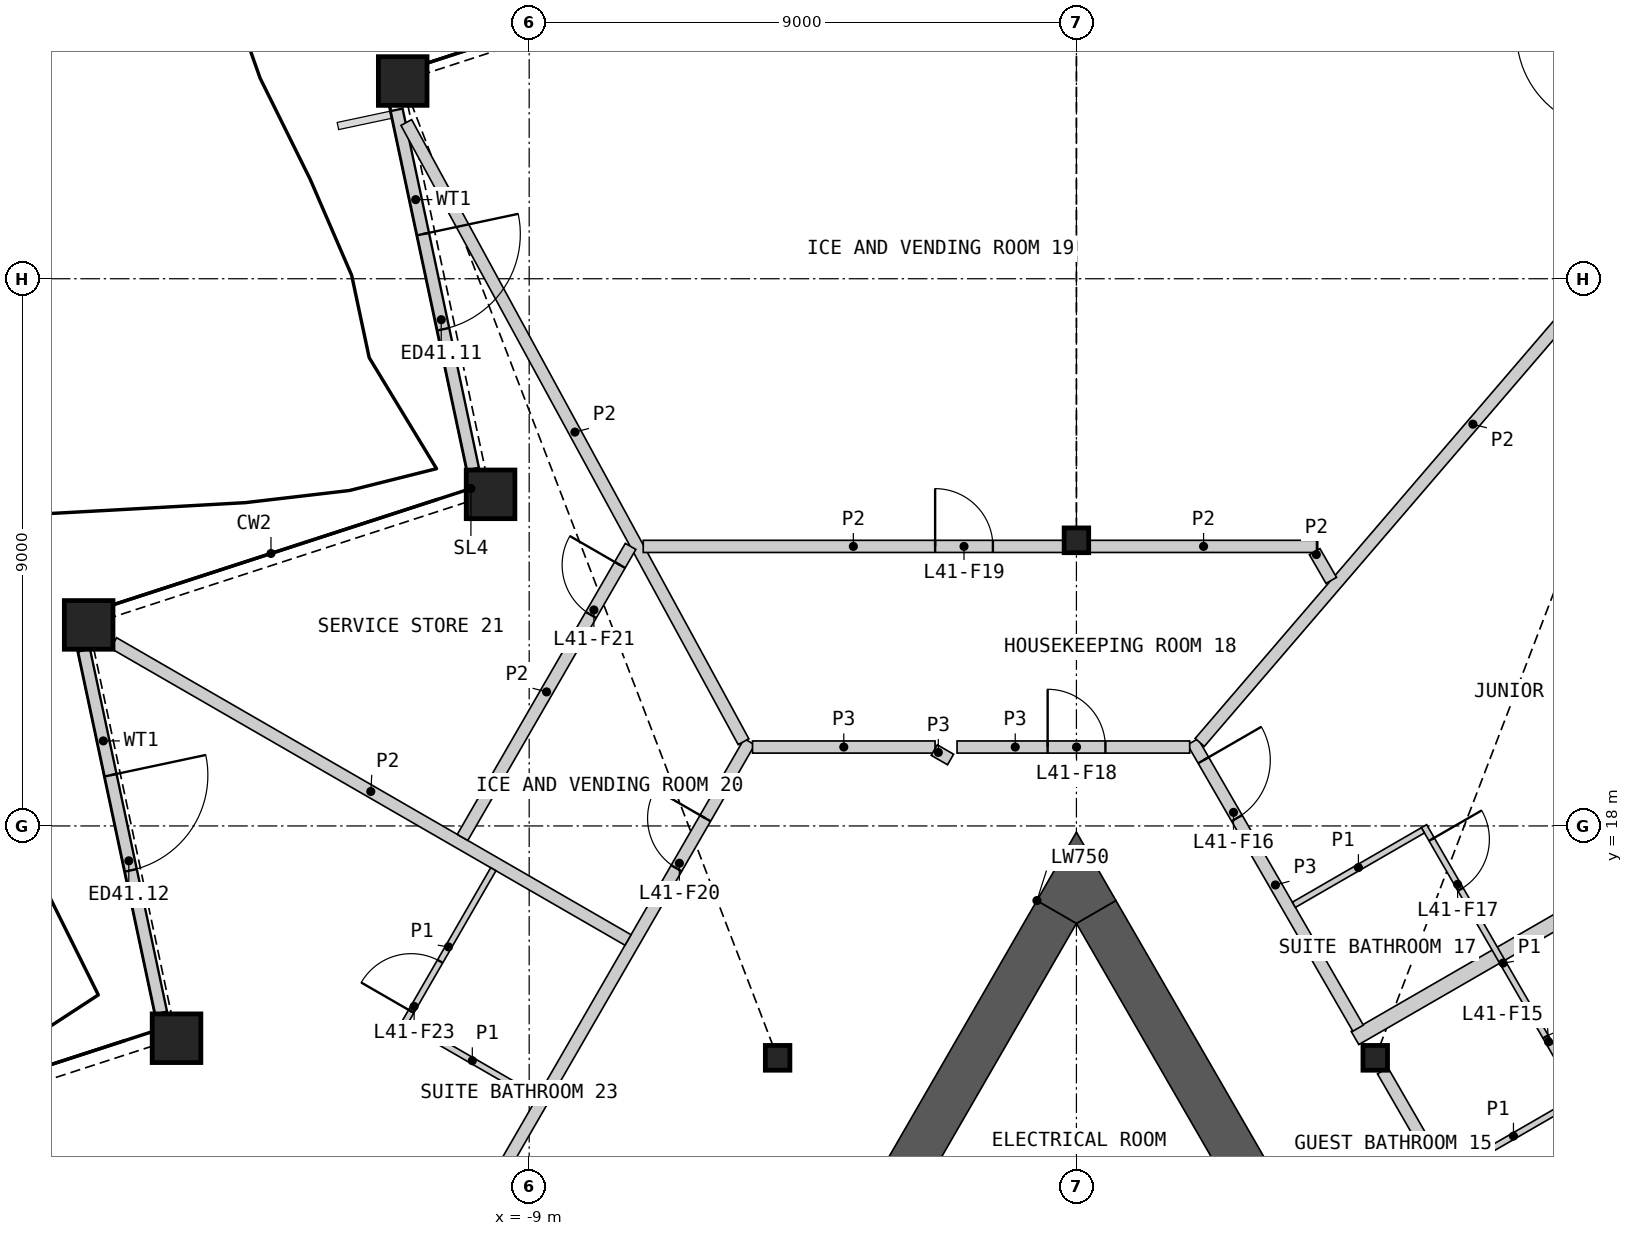
"""IFC4 building model, lengths in metres.
Left out: names, types, materials, properties, quantities, classifications, styles, units other than length and angle.
Written with IfcOpenShell. Run it as: python <this file> out.ifc"""

import sys

from ifc_helpers import new_model, si_unit, direction, frame, frame_2d, origin, origin_2d, place, context, subcontext, project, spatial, polyline, rectangle, hollow_rectangle, i_section, outline, extrude, element, fill, save


model = new_model("IFC4")
c1 = context("Model", 3, precision=1e-05, world=origin(), true_north=direction((0.0, 1.0)))
c2 = subcontext(c1, "Body", "Model", "MODEL_VIEW")
j1 = project(units=[si_unit("LENGTHUNIT", "METRE"), si_unit("PLANEANGLEUNIT", "RADIAN")], contexts=[c1])
p1 = place(None, origin())
s1 = spatial("IfcSite", under=j1, at=p1, CompositionType="ELEMENT")
p2 = place(p1, origin())
s2 = spatial("IfcBuilding", under=s1, at=p2, CompositionType="ELEMENT")
p3 = place(p2, frame((0.0, 0.0, 190.8)))
s3 = spatial("IfcBuildingStorey", under=s2, at=p3, CompositionType="ELEMENT", Elevation=190.8)
for number, where, z_axis, x_axis in (
    (1, (-11.08, 30.252, 0.0), (0.0, 0.0, 1.0), (1.0, 0.0, 0.0)),
    (2, (-9.635, 23.454, 0.0), (0.0, 0.0, 1.0), (1.0, 0.0, 0.0)),
    (3, (-16.245, 21.306, 0.0), (0.0, 0.0, 1.0), (1.0, 0.0, 0.0)),
    (4, (-14.8, 14.508, 0.0), (0.0, 0.0, 1.0), (1.0, 0.0, 0.0)),
):
    element("IfcColumn", number, at=place(p3, frame(where, z_axis=z_axis, x_axis=x_axis)), inside=s3, PredefinedType="COLUMN", context=c2, shape_type="SweptSolid", body=[
        extrude(hollow_rectangle(XDim=0.8, YDim=0.8, WallThickness=0.05, at=origin_2d()), origin(), (0.0, 0.0, 1.0), 3.6),
    ])
for number, where, z_axis, x_axis in (
    (5, (0.0, 22.698, 0.0), (0.0, 0.0, 1.0), (1.0, 0.0, 0.0)),
    (6, (-4.914, 14.186, 0.0), (0.0, 0.0, 1.0), (1.0, 0.0, 0.0)),
    (7, (4.914, 14.186, 0.0), (0.0, 0.0, 1.0), (1.0, 0.0, 0.0)),
):
    element("IfcColumn", number, at=place(p3, frame(where, z_axis=z_axis, x_axis=x_axis)), inside=s3, PredefinedType="COLUMN", context=c2, shape_type="SweptSolid", body=[
        extrude(i_section(OverallWidth=0.404, OverallDepth=0.407, WebThickness=0.027, FlangeThickness=0.044, at=origin_2d()), origin(), (0.0, 0.0, 1.0), 3.6),
    ])
p4 = place(p3, frame((10.825, 30.394, 0.0), z_axis=(0.0, 0.0, 1.0), x_axis=(-0.9510558006, 0.30901919705, 0.0)))
e8 = element("IfcWall", 8, at=p4, inside=s3, PredefinedType="SOLIDWALL", context=c2, shape_type="SweptSolid", body=[
    extrude(rectangle(XDim=5.778, YDim=0.2, at=frame_2d((2.889, 0.0))), origin(), (0.0, 0.0, 1.0), 2.701),
])
p5 = place(p4, frame((2.089, 0.0, 0.0)))
e9 = element("IfcOpeningElement", 9, at=p5, cuts=e8, PredefinedType="OPENING", context=c2, shape_type="SweptSolid", body=[
    extrude(rectangle(XDim=1.6, YDim=2.4, at=frame_2d((0.8, 1.2))), frame((0.0, 0.11, 0.0), z_axis=(0.0, -1.0, 0.0), x_axis=(1.0, 0.0, 0.0)), (0.0, 0.0, 1.0), 0.22),
])
p6 = place(p3, frame((-11.18, 29.778, 0.0), z_axis=(0.0, 0.0, 1.0), x_axis=(0.207894531291, -0.978151247946, 0.0)))
e10 = element("IfcWall", 10, at=p6, inside=s3, PredefinedType="SOLIDWALL", context=c2, shape_type="SweptSolid", body=[
    extrude(rectangle(XDim=6.04, YDim=0.2, at=frame_2d((3.02, 0.0))), origin(), (0.0, 0.0, 1.0), 2.701),
])
p7 = place(p6, frame((2.089, 0.0, 0.0)))
e11 = element("IfcOpeningElement", 11, at=p7, cuts=e10, PredefinedType="OPENING", context=c2, shape_type="SweptSolid", body=[
    extrude(rectangle(XDim=1.6, YDim=2.4, at=frame_2d((0.8, 1.2))), frame((0.0, 0.11, 0.0), z_axis=(0.0, -1.0, 0.0), x_axis=(1.0, 0.0, 0.0)), (0.0, 0.0, 1.0), 0.22),
])
p8 = place(p3, frame((-16.321, 20.89, 0.0), z_axis=(0.0, 0.0, 1.0), x_axis=(0.207912864597, -0.978147351238, 0.0)))
e12 = element("IfcWall", 12, at=p8, inside=s3, PredefinedType="SOLIDWALL", context=c2, shape_type="SweptSolid", body=[
    extrude(rectangle(XDim=6.098, YDim=0.2, at=frame_2d((3.049, 0.0))), origin(), (0.0, 0.0, 1.0), 2.701),
])
p9 = place(p8, frame((2.101, 0.0, 0.0)))
e13 = element("IfcOpeningElement", 13, at=p9, cuts=e12, PredefinedType="OPENING", context=c2, shape_type="SweptSolid", body=[
    extrude(rectangle(XDim=1.6, YDim=2.4, at=frame_2d((0.8, 1.2))), frame((0.0, 0.11, 0.0), z_axis=(0.0, -1.0, 0.0), x_axis=(1.0, 0.0, 0.0)), (0.0, 0.0, 1.0), 0.22),
])
p10 = place(p3, frame((6.875, 5.24, 0.0), z_axis=(0.0, 0.0, 1.0), x_axis=(-0.499997217876, 0.866027010039, 0.0)))
e14 = element("IfcWall", 14, at=p10, inside=s3, PredefinedType="SHEAR", context=c2, shape_type="SweptSolid", body=[
    extrude(rectangle(XDim=13.101, YDim=0.75, at=frame_2d((6.551, 0.0))), origin(), (0.0, 0.0, 1.0), 3.25),
])
p11 = place(p3, frame((-0.325, 16.585, 0.0), z_axis=(0.0, 0.0, 1.0), x_axis=(-0.500012199891, -0.86601836006, 0.0)))
e15 = element("IfcWall", 15, at=p11, inside=s3, PredefinedType="SHEAR", context=c2, shape_type="SweptSolid", body=[
    extrude(rectangle(XDim=7.051, YDim=0.75, at=frame_2d((3.525, 0.0))), origin(), (0.0, 0.0, 1.0), 3.25),
])
p12 = place(p3, origin())
e16 = element("IfcWall", 16, at=p12, inside=s3, PredefinedType="SHEAR", context=c2, shape_type="SweptSolid", body=[
    extrude(outline(polyline([(-0.649, 16.773), (0.0, 17.898), (0.649, 16.773), (0.0, 16.398), (-0.649, 16.773)])), origin(), (0.0, 0.0, 1.0), 3.25),
])
p13 = place(p3, frame((-19.476, -5.035, 0.0), z_axis=(0.0, 0.0, 1.0), x_axis=(0.500000757641, 0.86602496636, 0.0)))
e17 = element("IfcWall", 17, at=p13, inside=s3, PredefinedType="PARTITIONING", context=c2, shape_type="SweptSolid", body=[
    extrude(rectangle(XDim=28.198, YDim=0.2, at=frame_2d((14.099, 0.0))), origin(), (0.0, 0.0, 1.0), 3.25),
])
p14 = place(p13, frame((25.796, 0.0, 0.0)))
e18 = element("IfcOpeningElement", 18, at=p14, cuts=e17, PredefinedType="OPENING", context=c2, shape_type="SweptSolid", body=[
    extrude(rectangle(XDim=0.95, YDim=2.1, at=frame_2d((0.475, 1.05))), frame((0.0, 0.11, 0.0), z_axis=(0.0, -1.0, 0.0), x_axis=(1.0, 0.0, 0.0)), (0.0, 0.0, 1.0), 0.22),
])
p15 = place(p13, frame((14.603, 0.0, 0.0)))
e19 = element("IfcOpeningElement", 19, at=p15, cuts=e17, PredefinedType="OPENING", context=c2, shape_type="SweptSolid", body=[
    extrude(rectangle(XDim=1.1, YDim=2.1, at=frame_2d((0.55, 1.05))), frame((0.0, 0.11, 0.0), z_axis=(0.0, -1.0, 0.0), x_axis=(1.0, 0.0, 0.0)), (0.0, 0.0, 1.0), 0.22),
])
p16 = place(p13, frame((11.993, 0.0, 0.0)))
e20 = element("IfcOpeningElement", 20, at=p16, cuts=e17, PredefinedType="OPENING", context=c2, shape_type="SweptSolid", body=[
    extrude(rectangle(XDim=1.1, YDim=2.1, at=frame_2d((0.55, 1.05))), frame((0.0, 0.11, 0.0), z_axis=(0.0, -1.0, 0.0), x_axis=(1.0, 0.0, 0.0)), (0.0, 0.0, 1.0), 0.22),
])
p17 = place(p13, frame((1.452, 0.0, 0.0)))
e21 = element("IfcOpeningElement", 21, at=p17, cuts=e17, PredefinedType="OPENING", context=c2, shape_type="SweptSolid", body=[
    extrude(rectangle(XDim=0.95, YDim=2.1, at=frame_2d((0.475, 1.05))), frame((0.0, 0.11, 0.0), z_axis=(0.0, -1.0, 0.0), x_axis=(1.0, 0.0, 0.0)), (0.0, 0.0, 1.0), 0.22),
])
p18 = place(p3, frame((4.582, 14.512, 0.0), z_axis=(0.0, 0.0, 1.0), x_axis=(0.866027263711, 0.4999967785, 0.0)))
e22 = element("IfcWall", 22, at=p18, inside=s3, PredefinedType="PARTITIONING", context=c2, shape_type="SweptSolid", body=[
    extrude(rectangle(XDim=12.994, YDim=0.25, at=frame_2d((6.497, 0.0))), origin(), (0.0, 0.0, 1.0), 2.404),
])
p19 = place(p3, frame((5.038, 13.972, 0.0), z_axis=(0.0, 0.0, 1.0), x_axis=(0.50000393355, -0.866023132736, 0.0)))
e23 = element("IfcWall", 23, at=p19, inside=s3, PredefinedType="PARTITIONING", context=c2, shape_type="SweptSolid", body=[
    extrude(rectangle(XDim=9.335, YDim=0.2, at=frame_2d((4.667, 0.0))), origin(), (0.0, 0.0, 1.0), 3.25),
])
p20 = place(p19, frame((5.979, 0.0, 0.0)))
e24 = element("IfcOpeningElement", 24, at=p20, cuts=e23, PredefinedType="OPENING", context=c2, shape_type="SweptSolid", body=[
    extrude(rectangle(XDim=1.8, YDim=2.1, at=frame_2d((0.9, 1.05))), frame((0.0, 0.11, 0.0), z_axis=(0.0, -1.0, 0.0), x_axis=(1.0, 0.0, 0.0)), (0.0, 0.0, 1.0), 0.22),
])
p21 = place(p19, frame((3.163, 0.0, 0.0)))
e25 = element("IfcOpeningElement", 25, at=p21, cuts=e23, PredefinedType="OPENING", context=c2, shape_type="SweptSolid", body=[
    extrude(rectangle(XDim=1.0, YDim=2.1, at=frame_2d((0.5, 1.05))), frame((0.0, 0.11, 0.0), z_axis=(0.0, -1.0, 0.0), x_axis=(1.0, 0.0, 0.0)), (0.0, 0.0, 1.0), 0.22),
])
p22 = place(p3, frame((1.913, 19.385, 0.0), z_axis=(0.0, 0.0, 1.0), x_axis=(0.499972435384, -0.866041317638, 0.0)))
e26 = element("IfcWall", 26, at=p22, inside=s3, PredefinedType="PARTITIONING", context=c2, shape_type="SweptSolid", body=[
    extrude(rectangle(XDim=5.439, YDim=0.2, at=frame_2d((2.719, 0.0))), origin(), (0.0, 0.0, 1.0), 3.25),
])
p23 = place(p22, frame((0.351, 0.0, 0.0)))
e27 = element("IfcOpeningElement", 27, at=p23, cuts=e26, PredefinedType="OPENING", context=c2, shape_type="SweptSolid", body=[
    extrude(rectangle(XDim=1.1, YDim=2.1, at=frame_2d((0.55, 1.05))), frame((0.0, 0.11, 0.0), z_axis=(0.0, -1.0, 0.0), x_axis=(1.0, 0.0, 0.0)), (0.0, 0.0, 1.0), 0.22),
])
p24 = place(p3, frame((-1.963, 19.298, 0.0), z_axis=(0.0, 0.0, 1.0), x_axis=(1.0, 0.0, 0.0)))
e28 = element("IfcWall", 28, at=p24, inside=s3, PredefinedType="PARTITIONING", context=c2, shape_type="SweptSolid", body=[
    extrude(rectangle(XDim=3.826, YDim=0.2, at=frame_2d((1.913, 0.0))), origin(), (0.0, 0.0, 1.0), 3.25),
])
p25 = place(p24, frame((1.49, 0.0, 0.0)))
e29 = element("IfcOpeningElement", 29, at=p25, cuts=e28, PredefinedType="OPENING", context=c2, shape_type="SweptSolid", body=[
    extrude(rectangle(XDim=0.95, YDim=2.1, at=frame_2d((0.475, 1.05))), frame((0.0, 0.11, 0.0), z_axis=(0.0, -1.0, 0.0), x_axis=(1.0, 0.0, 0.0)), (0.0, 0.0, 1.0), 0.22),
])
p26 = place(p3, frame((-5.327, 19.298, 0.0), z_axis=(0.0, 0.0, 1.0), x_axis=(1.0, 0.0, 0.0)))
e30 = element("IfcWall", 30, at=p26, inside=s3, PredefinedType="PARTITIONING", context=c2, shape_type="SweptSolid", body=[
    extrude(rectangle(XDim=3.002, YDim=0.2, at=frame_2d((1.501, 0.0))), origin(), (0.0, 0.0, 1.0), 3.25),
])
p27 = place(p3, frame((-2.338, 19.248, 0.0), z_axis=(0.0, 0.0, 1.0), x_axis=(0.866395311824, -0.499358752451, 0.0)))
e31 = element("IfcWall", 31, at=p27, inside=s3, PredefinedType="PARTITIONING", context=c2, shape_type="SweptSolid", body=[
    extrude(rectangle(XDim=0.31, YDim=0.2, at=frame_2d((0.155, 0.0))), origin(), (0.0, 0.0, 1.0), 3.25),
])
p28 = place(p3, frame((2.028, 19.374, 0.0), z_axis=(0.0, 0.0, 1.0), x_axis=(0.651304244859, 0.758816697647, 0.0)))
e32 = element("IfcWall", 32, at=p28, inside=s3, PredefinedType="PARTITIONING", context=c2, shape_type="SweptSolid", body=[
    extrude(rectangle(XDim=13.795, YDim=0.2, at=frame_2d((6.897, 0.0))), origin(), (0.0, 0.0, 1.0), 2.404),
])
p29 = place(p3, frame((-11.021, 29.57, 0.0), z_axis=(0.0, 0.0, 1.0), x_axis=(0.478233946204, -0.878232482147, 0.0)))
e33 = element("IfcWall", 33, at=p29, inside=s3, PredefinedType="PARTITIONING", context=c2, shape_type="SweptSolid", body=[
    extrude(rectangle(XDim=11.596, YDim=0.2, at=frame_2d((5.798, 0.0))), origin(), (0.0, 0.0, 1.0), 2.404),
])
p30 = place(p3, frame((-15.835, 21.009, 0.0), z_axis=(0.0, 0.0, 1.0), x_axis=(0.866024525919, -0.500001520505, 0.0)))
e34 = element("IfcWall", 34, at=p30, inside=s3, PredefinedType="PARTITIONING", context=c2, shape_type="SweptSolid", body=[
    extrude(rectangle(XDim=9.769, YDim=0.2, at=frame_2d((4.885, 0.0))), origin(), (0.0, 0.0, 1.0), 2.404),
])
p31 = place(p3, frame((7.346, 10.175, 0.0), z_axis=(0.0, 0.0, 1.0), x_axis=(0.86602913801, 0.499993532075, 0.0)))
e35 = element("IfcWall", 35, at=p31, inside=s3, PredefinedType="PARTITIONING", context=c2, shape_type="SweptSolid", body=[
    extrude(rectangle(XDim=8.134, YDim=0.2, at=frame_2d((4.067, 0.0))), origin(), (0.0, 0.0, 1.0), 2.404),
])
p32 = place(p3, frame((-7.124, 22.598, 0.0), z_axis=(0.0, 0.0, 1.0), x_axis=(1.0, 0.0, 0.0)))
e36 = element("IfcWall", 36, at=p32, inside=s3, PredefinedType="PARTITIONING", context=c2, shape_type="SweptSolid", body=[
    extrude(rectangle(XDim=6.911, YDim=0.2, at=frame_2d((3.455, 0.0))), origin(), (0.0, 0.0, 1.0), 2.404),
])
p33 = place(p32, frame((4.801, 0.0, 0.0)))
e37 = element("IfcOpeningElement", 37, at=p33, cuts=e36, PredefinedType="OPENING", context=c2, shape_type="SweptSolid", body=[
    extrude(rectangle(XDim=0.95, YDim=2.1, at=frame_2d((0.475, 1.05))), frame((0.0, 0.11, 0.0), z_axis=(0.0, -1.0, 0.0), x_axis=(1.0, 0.0, 0.0)), (0.0, 0.0, 1.0), 0.22),
])
p34 = place(p3, frame((-10.096, 17.811, 0.0), z_axis=(0.0, 0.0, 1.0), x_axis=(0.500015590807, 0.866016402241, 0.0)))
e38 = element("IfcWall", 38, at=p34, inside=s3, PredefinedType="PARTITIONING", context=c2, shape_type="SweptSolid", body=[
    extrude(rectangle(XDim=5.527, YDim=0.2, at=frame_2d((2.764, 0.0))), origin(), (0.0, 0.0, 1.0), 2.404),
])
p35 = place(p34, frame((4.225, 0.0, 0.0)))
e39 = element("IfcOpeningElement", 39, at=p35, cuts=e38, PredefinedType="OPENING", context=c2, shape_type="SweptSolid", body=[
    extrude(rectangle(XDim=0.95, YDim=2.1, at=frame_2d((0.475, 1.05))), frame((0.0, 0.11, 0.0), z_axis=(0.0, -1.0, 0.0), x_axis=(1.0, 0.0, 0.0)), (0.0, 0.0, 1.0), 0.22),
])
p36 = place(p3, frame((0.214, 22.598, 0.0), z_axis=(0.0, 0.0, 1.0), x_axis=(1.0, 0.0, 0.0)))
e40 = element("IfcWall", 40, at=p36, inside=s3, PredefinedType="PARTITIONING", context=c2, shape_type="SweptSolid", body=[
    extrude(rectangle(XDim=3.755, YDim=0.2, at=frame_2d((1.877, 0.0))), origin(), (0.0, 0.0, 1.0), 2.404),
])
p37 = place(p3, frame((3.918, 22.511, 0.0), z_axis=(0.0, 0.0, 1.0), x_axis=(0.500083826171, -0.865977001312, 0.0)))
e41 = element("IfcWall", 41, at=p37, inside=s3, PredefinedType="PARTITIONING", context=c2, shape_type="SweptSolid", body=[
    extrude(rectangle(XDim=0.546, YDim=0.2, at=frame_2d((0.273, 0.0))), origin(), (0.0, 0.0, 1.0), 2.404),
])
p38 = place(p3, frame((5.717, 17.996, 0.0), z_axis=(0.0, 0.0, 1.0), x_axis=(0.500027264788, -0.866009661879, 0.0)))
e42 = element("IfcWall", 42, at=p38, inside=s3, PredefinedType="PARTITIONING", context=c2, shape_type="SweptSolid", body=[
    extrude(rectangle(XDim=5.2, YDim=0.1, at=frame_2d((2.6, 0.0))), origin(), (0.0, 0.0, 1.0), 2.404),
])
p39 = place(p38, frame((4.0, 0.0, 0.0)))
e43 = element("IfcOpeningElement", 43, at=p39, cuts=e42, PredefinedType="OPENING", context=c2, shape_type="SweptSolid", body=[
    extrude(rectangle(XDim=0.95, YDim=2.1, at=frame_2d((0.475, 1.05))), frame((0.0, 0.06, 0.0), z_axis=(0.0, -1.0, 0.0), x_axis=(1.0, 0.0, 0.0)), (0.0, 0.0, 1.0), 0.12),
])
p40 = place(p38, frame((0.25, 0.0, 0.0)))
e44 = element("IfcOpeningElement", 44, at=p40, cuts=e42, PredefinedType="OPENING", context=c2, shape_type="SweptSolid", body=[
    extrude(rectangle(XDim=0.95, YDim=2.1, at=frame_2d((0.475, 1.05))), frame((0.0, 0.06, 0.0), z_axis=(0.0, -1.0, 0.0), x_axis=(1.0, 0.0, 0.0)), (0.0, 0.0, 1.0), 0.12),
])
p41 = place(p3, frame((-11.065, 14.733, 0.0), z_axis=(0.0, 0.0, 1.0), x_axis=(0.500037662692, 0.866003658127, 0.0)))
e45 = element("IfcWall", 45, at=p41, inside=s3, PredefinedType="PARTITIONING", context=c2, shape_type="SweptSolid", body=[
    extrude(rectangle(XDim=2.95, YDim=0.1, at=frame_2d((1.475, 0.0))), origin(), (0.0, 0.0, 1.0), 2.404),
])
p42 = place(p41, frame((0.25, 0.0, 0.0)))
e46 = element("IfcOpeningElement", 46, at=p42, cuts=e45, PredefinedType="OPENING", context=c2, shape_type="SweptSolid", body=[
    extrude(rectangle(XDim=0.95, YDim=2.1, at=frame_2d((0.475, 1.05))), frame((0.0, 0.06, 0.0), z_axis=(0.0, -1.0, 0.0), x_axis=(1.0, 0.0, 0.0)), (0.0, 0.0, 1.0), 0.12),
])
p43 = place(p3, frame((3.576, 16.703, 0.0), z_axis=(0.0, 0.0, 1.0), x_axis=(0.866057815567, 0.499943856944, 0.0)))
e47 = element("IfcWall", 47, at=p43, inside=s3, PredefinedType="PARTITIONING", context=c2, shape_type="SweptSolid", body=[
    extrude(rectangle(XDim=2.45, YDim=0.1, at=frame_2d((1.225, 0.0))), origin(), (0.0, 0.0, 1.0), 2.404),
])
for number, where, z_axis, x_axis in (
    (48, (6.126, 12.286, 0.0), (0.0, 0.0, 1.0), (0.866, 0.5, 0.0)),
    (49, (-10.996, 14.752, 0.0), (0.0, 0.0, 1.0), (0.866, -0.5, 0.0)),
):
    element("IfcWall", number, at=place(p3, frame(where, z_axis=z_axis, x_axis=x_axis)), inside=s3, PredefinedType="PARTITIONING", context=c2, shape_type="SweptSolid", body=[
        extrude(rectangle(XDim=2.45, YDim=0.1, at=frame_2d((1.225, 0.0))), origin(), (0.0, 0.0, 1.0), 2.404),
    ])
p44 = place(p7, origin())
e50 = element("IfcDoor", 50, at=p44, inside=s3, OperationType="DOUBLE_DOOR_SINGLE_SWING", PredefinedType="DOOR", context=c2, shape_type="SweptSolid", body=[
    extrude(rectangle(XDim=1.6, YDim=2.4, at=frame_2d((0.8, 1.2))), frame((0.0, 0.025, 0.0), z_axis=(0.0, -1.0, 0.0), x_axis=(1.0, 0.0, 0.0)), (0.0, 0.0, 1.0), 0.05),
])
fill(e11, e50)
p45 = place(p9, origin())
e51 = element("IfcDoor", 51, at=p45, inside=s3, OperationType="DOUBLE_DOOR_SINGLE_SWING", PredefinedType="DOOR", context=c2, shape_type="SweptSolid", body=[
    extrude(rectangle(XDim=1.6, YDim=2.4, at=frame_2d((0.8, 1.2))), frame((0.0, 0.025, 0.0), z_axis=(0.0, -1.0, 0.0), x_axis=(1.0, 0.0, 0.0)), (0.0, 0.0, 1.0), 0.05),
])
fill(e13, e51)
p46 = place(p39, origin())
e52 = element("IfcDoor", 52, at=p46, inside=s3, OperationType="SINGLE_SWING_RIGHT", PredefinedType="DOOR", context=c2, shape_type="SweptSolid", body=[
    extrude(rectangle(XDim=0.95, YDim=2.1, at=frame_2d((0.475, 1.05))), frame((0.0, 0.025, 0.0), z_axis=(0.0, -1.0, 0.0), x_axis=(1.0, 0.0, 0.0)), (0.0, 0.0, 1.0), 0.05),
])
fill(e43, e52)
p47 = place(p23, origin())
e53 = element("IfcDoor", 53, at=p47, inside=s3, OperationType="SINGLE_SWING_LEFT", PredefinedType="DOOR", context=c2, shape_type="SweptSolid", body=[
    extrude(rectangle(XDim=1.1, YDim=2.1, at=frame_2d((0.55, 1.05))), frame((0.0, 0.025, 0.0), z_axis=(0.0, -1.0, 0.0), x_axis=(1.0, 0.0, 0.0)), (0.0, 0.0, 1.0), 0.05),
])
fill(e27, e53)
p48 = place(p40, origin())
e54 = element("IfcDoor", 54, at=p48, inside=s3, OperationType="SINGLE_SWING_LEFT", PredefinedType="DOOR", context=c2, shape_type="SweptSolid", body=[
    extrude(rectangle(XDim=0.95, YDim=2.1, at=frame_2d((0.475, 1.05))), frame((0.0, 0.025, 0.0), z_axis=(0.0, -1.0, 0.0), x_axis=(1.0, 0.0, 0.0)), (0.0, 0.0, 1.0), 0.05),
])
fill(e44, e54)
p49 = place(p25, origin())
e55 = element("IfcDoor", 55, at=p49, inside=s3, OperationType="SINGLE_SWING_LEFT", PredefinedType="DOOR", context=c2, shape_type="SweptSolid", body=[
    extrude(rectangle(XDim=0.95, YDim=2.1, at=frame_2d((0.475, 1.05))), frame((0.0, 0.025, 0.0), z_axis=(0.0, -1.0, 0.0), x_axis=(1.0, 0.0, 0.0)), (0.0, 0.0, 1.0), 0.05),
])
fill(e29, e55)
p50 = place(p33, origin())
e56 = element("IfcDoor", 56, at=p50, inside=s3, OperationType="SINGLE_SWING_LEFT", PredefinedType="DOOR", context=c2, shape_type="SweptSolid", body=[
    extrude(rectangle(XDim=0.95, YDim=2.1, at=frame_2d((0.475, 1.05))), frame((0.0, 0.025, 0.0), z_axis=(0.0, -1.0, 0.0), x_axis=(1.0, 0.0, 0.0)), (0.0, 0.0, 1.0), 0.05),
])
fill(e37, e56)
p51 = place(p14, origin())
e57 = element("IfcDoor", 57, at=p51, inside=s3, OperationType="SINGLE_SWING_RIGHT", PredefinedType="DOOR", context=c2, shape_type="SweptSolid", body=[
    extrude(rectangle(XDim=0.95, YDim=2.1, at=frame_2d((0.475, 1.05))), frame((0.0, 0.025, 0.0), z_axis=(0.0, -1.0, 0.0), x_axis=(1.0, 0.0, 0.0)), (0.0, 0.0, 1.0), 0.05),
])
fill(e18, e57)
p52 = place(p35, origin())
e58 = element("IfcDoor", 58, at=p52, inside=s3, OperationType="SINGLE_SWING_RIGHT", PredefinedType="DOOR", context=c2, shape_type="SweptSolid", body=[
    extrude(rectangle(XDim=0.95, YDim=2.1, at=frame_2d((0.475, 1.05))), frame((0.0, 0.025, 0.0), z_axis=(0.0, -1.0, 0.0), x_axis=(1.0, 0.0, 0.0)), (0.0, 0.0, 1.0), 0.05),
])
fill(e39, e58)
p53 = place(p42, origin())
e59 = element("IfcDoor", 59, at=p53, inside=s3, OperationType="SINGLE_SWING_LEFT", PredefinedType="DOOR", context=c2, shape_type="SweptSolid", body=[
    extrude(rectangle(XDim=0.95, YDim=2.1, at=frame_2d((0.475, 1.05))), frame((0.0, 0.025, 0.0), z_axis=(0.0, -1.0, 0.0), x_axis=(1.0, 0.0, 0.0)), (0.0, 0.0, 1.0), 0.05),
])
fill(e46, e59)
save(model, sys.argv[1])
